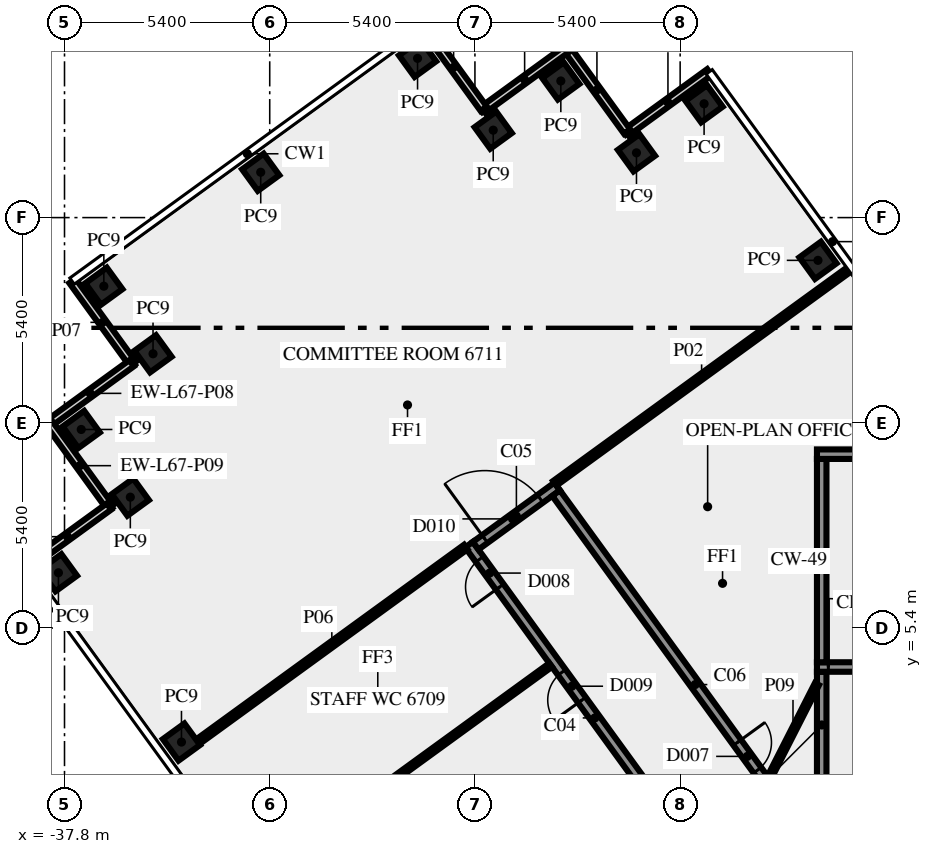
"""IFC4 building model, lengths in metres.
Left out: names, types, materials, properties, quantities, classifications, styles, units other than length and angle.
Written with IfcOpenShell. Run it as: python <this file> out.ifc"""

import sys

from ifc_helpers import new_model, si_unit, direction, frame, frame_2d, origin, origin_2d, place, context, subcontext, project, spatial, rectangle, extrude, element, fill, save


model = new_model("IFC4")
c1 = context("Model", 3, precision=1e-05, world=origin(), true_north=direction((0.0, 1.0)))
c2 = subcontext(c1, "Body", "Model", "MODEL_VIEW")
j1 = project(units=[si_unit("LENGTHUNIT", "METRE"), si_unit("PLANEANGLEUNIT", "RADIAN")], contexts=[c1])
p1 = place(None, origin())
s1 = spatial("IfcSite", under=j1, at=p1, CompositionType="ELEMENT")
p2 = place(p1, origin())
s2 = spatial("IfcBuilding", under=s1, at=p2, CompositionType="ELEMENT")
p3 = place(p2, frame((0.0, 0.0, 289.0)))
s3 = spatial("IfcBuildingStorey", under=s2, at=p3, CompositionType="ELEMENT", Elevation=289.0)
for number, where, z_axis, x_axis in (
    (1, (-17.974, 15.075, 0.0), (0.0, 0.0, 1.0), (-0.588, 0.809, 0.0)),
    (2, (-20.97, 19.195, 0.0), (0.0, 0.0, 1.0), (-0.588, 0.809, 0.0)),
    (3, (-22.749, 17.904, 0.0), (0.0, 0.0, 1.0), (-0.588, 0.809, 0.0)),
    (4, (-24.74, 19.795, 0.0), (0.0, 0.0, 1.0), (-0.588, 0.809, 0.0)),
    (5, (-26.519, 18.5, 0.0), (0.0, 0.0, 1.0), (-0.588, 0.809, 0.0)),
    (6, (-28.51, 20.39, 0.0), (0.0, 0.0, 1.0), (-0.809, -0.588, 0.0)),
    (7, (-32.637, 17.393, 0.0), (0.0, 0.0, 1.0), (-0.809, -0.588, 0.0)),
    (8, (-36.765, 14.395, 0.0), (0.0, 0.0, 1.0), (0.588, -0.809, 0.0)),
    (9, (-35.471, 12.616, 0.0), (0.0, 0.0, 1.0), (-0.809, -0.588, 0.0)),
    (10, (-37.36, 10.625, 0.0), (0.0, 0.0, 1.0), (0.588, -0.809, 0.0)),
    (11, (-36.068, 8.844, 0.0), (0.0, 0.0, 1.0), (0.588, -0.809, 0.0)),
    (12, (-37.96, 6.855, 0.0), (0.0, 0.0, 1.0), (0.588, -0.809, 0.0)),
    (13, (-34.722, 2.4, 0.0), (0.0, 0.0, 1.0), (0.588, -0.809, 0.0)),
):
    element("IfcColumn", number, at=place(p3, frame(where, z_axis=z_axis, x_axis=x_axis)), inside=s3, PredefinedType="COLUMN", context=c2, shape_type="SweptSolid", body=[
        extrude(rectangle(XDim=0.7, YDim=0.7, at=origin_2d()), origin(), (0.0, 0.0, 1.0), 3.65),
    ])
for number, where, z_axis, x_axis in (
    (14, (-20.829, 20.025, 0.0), (0.0, 0.0, 1.0), (-0.809, -0.588, 0.0)),
    (15, (-22.996, 18.466, 0.0), (0.0, 0.0, 1.0), (-0.588, 0.809, 0.0)),
):
    element("IfcWall", number, at=place(p3, frame(where, z_axis=z_axis, x_axis=x_axis)), inside=s3, PredefinedType="SOLIDWALL", context=c2, shape_type="SweptSolid", body=[
        extrude(rectangle(XDim=2.7, YDim=0.2, at=frame_2d((1.35, 0.0))), origin(), (0.0, 0.0, 1.0), 3.65),
    ])
for number, where, z_axis, x_axis in (
    (16, (-24.6, 20.623, 0.0), (0.0, 0.0, 1.0), (-0.809, -0.588, 0.0)),
    (17, (-26.768, 19.063, 0.0), (0.0, 0.0, 1.0), (-0.588, 0.809, 0.0)),
):
    element("IfcWall", number, at=place(p3, frame(where, z_axis=z_axis, x_axis=x_axis)), inside=s3, PredefinedType="SOLIDWALL", context=c2, shape_type="SweptSolid", body=[
        extrude(rectangle(XDim=2.7, YDim=0.2, at=frame_2d((1.35, 0.0))), origin(), (0.0, 0.0, 1.0), 3.65),
    ])
for number, where, z_axis, x_axis in (
    (18, (-37.592, 14.536, 0.0), (0.0, 0.0, 1.0), (0.588, -0.809, 0.0)),
    (19, (-36.032, 12.369, 0.0), (0.0, 0.0, 1.0), (-0.809, -0.588, 0.0)),
    (20, (-38.189, 10.765, 0.0), (0.0, 0.0, 1.0), (0.588, -0.809, 0.0)),
    (21, (-36.629, 8.597, 0.0), (0.0, 0.0, 1.0), (-0.809, -0.588, 0.0)),
):
    element("IfcWall", number, at=place(p3, frame(where, z_axis=z_axis, x_axis=x_axis)), inside=s3, PredefinedType="SOLIDWALL", context=c2, shape_type="SweptSolid", body=[
        extrude(rectangle(XDim=2.7, YDim=0.2, at=frame_2d((1.35, 0.0))), origin(), (0.0, 0.0, 1.0), 3.65),
    ])
p4 = place(p3, frame((-17.875, 1.45, 0.0), z_axis=(0.0, 0.0, 1.0), x_axis=(0.0, 1.0, 0.0)))
e22 = element("IfcWall", 22, at=p4, inside=s3, PredefinedType="SHEAR", context=c2, shape_type="SweptSolid", body=[
    extrude(rectangle(XDim=2.8, YDim=0.25, at=frame_2d((1.4, 0.0))), origin(), (0.0, 0.0, 1.0), 3.65),
])
p5 = place(p3, frame((-18.0, 4.375, 0.0), z_axis=(0.0, 0.0, 1.0), x_axis=(1.0, 0.0, 0.0)))
e23 = element("IfcWall", 23, at=p5, inside=s3, PredefinedType="SHEAR", context=c2, shape_type="SweptSolid", body=[
    extrude(rectangle(XDim=10.5, YDim=0.25, at=frame_2d((5.25, 0.0))), origin(), (0.0, 0.0, 1.0), 3.65),
])
p6 = place(p5, frame((0.3, 0.0, 0.0)))
e24 = element("IfcOpeningElement", 24, at=p6, cuts=e23, PredefinedType="OPENING", context=c2, shape_type="SweptSolid", body=[
    extrude(rectangle(XDim=1.8, YDim=2.1, at=frame_2d((0.9, 1.05))), frame((0.0, 0.135, 0.0), z_axis=(0.0, -1.0, 0.0), x_axis=(1.0, 0.0, 0.0)), (0.0, 0.0, 1.0), 0.27),
])
p7 = place(p3, frame((-17.875, 4.5, 0.0), z_axis=(0.0, 0.0, 1.0), x_axis=(0.0, 1.0, 0.0)))
e25 = element("IfcWall", 25, at=p7, inside=s3, PredefinedType="SHEAR", context=c2, shape_type="SweptSolid", body=[
    extrude(rectangle(XDim=5.35, YDim=0.25, at=frame_2d((2.675, 0.0))), origin(), (0.0, 0.0, 1.0), 3.65),
])
p8 = place(p3, frame((-18.0, 9.975, 0.0), z_axis=(0.0, 0.0, 1.0), x_axis=(1.0, 0.0, 0.0)))
e26 = element("IfcWall", 26, at=p8, inside=s3, PredefinedType="SHEAR", context=c2, shape_type="SweptSolid", body=[
    extrude(rectangle(XDim=10.5, YDim=0.25, at=frame_2d((5.25, 0.0))), origin(), (0.0, 0.0, 1.0), 3.65),
])
p9 = place(p8, frame((4.5, 0.0, 1.0)))
e27 = element("IfcOpeningElement", 27, at=p9, cuts=e26, PredefinedType="OPENING", context=c2, shape_type="SweptSolid", body=[
    extrude(rectangle(XDim=1.2, YDim=1.2, at=frame_2d((0.6, 0.6))), frame((0.0, 0.135, 0.0), z_axis=(0.0, -1.0, 0.0), x_axis=(1.0, 0.0, 0.0)), (0.0, 0.0, 1.0), 0.27),
])
p10 = place(p3, frame((-20.531, -1.523, 0.0), z_axis=(0.0, 0.0, 1.0), x_axis=(-0.587782646447, 0.809018887626, 0.0)))
e28 = element("IfcWall", 28, at=p10, inside=s3, PredefinedType="SOLIDWALL", context=c2, shape_type="SweptSolid", body=[
    extrude(rectangle(XDim=11.27, YDim=0.25, at=frame_2d((5.635, 0.0))), origin(), (0.0, 0.0, 1.0), 3.65),
])
p11 = place(p10, frame((6.216, 0.0, 0.0)))
e29 = element("IfcOpeningElement", 29, at=p11, cuts=e28, PredefinedType="OPENING", context=c2, shape_type="SweptSolid", body=[
    extrude(rectangle(XDim=0.9, YDim=2.1, at=frame_2d((0.45, 1.05))), frame((0.0, 0.135, 0.0), z_axis=(0.0, -1.0, 0.0), x_axis=(1.0, 0.0, 0.0)), (0.0, 0.0, 1.0), 0.27),
])
p12 = place(p10, frame((9.896, 0.0, 0.0)))
e30 = element("IfcOpeningElement", 30, at=p12, cuts=e28, PredefinedType="OPENING", context=c2, shape_type="SweptSolid", body=[
    extrude(rectangle(XDim=0.9, YDim=2.1, at=frame_2d((0.45, 1.05))), frame((0.0, 0.135, 0.0), z_axis=(0.0, -1.0, 0.0), x_axis=(1.0, 0.0, 0.0)), (0.0, 0.0, 1.0), 0.27),
])
p13 = place(p3, frame((-26.981, 7.567, 0.0), z_axis=(0.0, 0.0, 1.0), x_axis=(0.809038743598, 0.587755315891, 0.0)))
e31 = element("IfcWall", 31, at=p13, inside=s3, PredefinedType="SOLIDWALL", context=c2, shape_type="SweptSolid", body=[
    extrude(rectangle(XDim=2.65, YDim=0.25, at=frame_2d((1.325, 0.0))), origin(), (0.0, 0.0, 1.0), 3.65),
])
p14 = place(p13, frame((0.3, 0.0, 0.0)))
e32 = element("IfcOpeningElement", 32, at=p14, cuts=e31, PredefinedType="OPENING", context=c2, shape_type="SweptSolid", body=[
    extrude(rectangle(XDim=1.8, YDim=2.1, at=frame_2d((0.9, 1.05))), frame((0.0, 0.135, 0.0), z_axis=(0.0, -1.0, 0.0), x_axis=(1.0, 0.0, 0.0)), (0.0, 0.0, 1.0), 0.27),
])
p15 = place(p3, frame((-24.865, 8.95, 0.0), z_axis=(0.0, 0.0, 1.0), x_axis=(0.587791617212, -0.809012369952, 0.0)))
e33 = element("IfcWall", 33, at=p15, inside=s3, PredefinedType="SOLIDWALL", context=c2, shape_type="SweptSolid", body=[
    extrude(rectangle(XDim=12.453, YDim=0.25, at=frame_2d((6.227, 0.0))), origin(), (0.0, 0.0, 1.0), 3.65),
])
p16 = place(p15, frame((8.112, 0.0, 0.0)))
e34 = element("IfcOpeningElement", 34, at=p16, cuts=e33, PredefinedType="OPENING", context=c2, shape_type="SweptSolid", body=[
    extrude(rectangle(XDim=0.9, YDim=2.1, at=frame_2d((0.45, 1.05))), frame((0.0, 0.135, 0.0), z_axis=(0.0, -1.0, 0.0), x_axis=(1.0, 0.0, 0.0)), (0.0, 0.0, 1.0), 0.27),
])
p17 = place(p3, frame((-17.172, 14.823, 0.0), z_axis=(0.0, 0.0, 1.0), x_axis=(-0.809013490065, -0.587790075531, 0.0)))
e35 = element("IfcWall", 35, at=p17, inside=s3, PredefinedType="PARTITIONING", context=c2, shape_type="SweptSolid", body=[
    extrude(rectangle(XDim=9.549, YDim=0.15, at=frame_2d((4.775, 0.0))), origin(), (0.0, 0.0, 1.0), 2.95),
])
p18 = place(p3, frame((-25.008, 4.427, 0.0), z_axis=(0.0, 0.0, 1.0), x_axis=(-0.808994684961, -0.587815957341, 0.0)))
e36 = element("IfcWall", 36, at=p18, inside=s3, PredefinedType="PARTITIONING", context=c2, shape_type="SweptSolid", body=[
    extrude(rectangle(XDim=9.55, YDim=0.12, at=frame_2d((4.775, 0.0))), origin(), (0.0, 0.0, 1.0), 2.95),
])
p19 = place(p3, frame((-34.291, 2.41, 0.0), z_axis=(0.0, 0.0, 1.0), x_axis=(0.809027940177, 0.587770186393, 0.0)))
e37 = element("IfcWall", 37, at=p19, inside=s3, PredefinedType="PARTITIONING", context=c2, shape_type="SweptSolid", body=[
    extrude(rectangle(XDim=8.715, YDim=0.15, at=frame_2d((4.357, 0.0))), origin(), (0.0, 0.0, 1.0), 3.65),
])
p20 = place(p3, frame((-19.261, 1.45, 0.0), z_axis=(0.0, 0.0, 1.0), x_axis=(0.453950796792, 0.891026752736, 0.0)))
e38 = element("IfcWall", 38, at=p20, inside=s3, PredefinedType="PARTITIONING", context=c2, shape_type="SweptSolid", body=[
    extrude(rectangle(XDim=2.778, YDim=0.12, at=frame_2d((1.389, 0.0))), origin(), (0.0, 0.0, 1.0), 3.65),
])
p21 = place(p6, origin())
e39 = element("IfcDoor", 39, at=p21, inside=s3, OperationType="DOUBLE_DOOR_SINGLE_SWING", PredefinedType="DOOR", context=c2, shape_type="SweptSolid", body=[
    extrude(rectangle(XDim=1.8, YDim=2.1, at=frame_2d((0.9, 1.05))), frame((0.0, 0.025, 0.0), z_axis=(0.0, -1.0, 0.0), x_axis=(1.0, 0.0, 0.0)), (0.0, 0.0, 1.0), 0.05),
])
fill(e24, e39)
p22 = place(p16, origin())
e40 = element("IfcDoor", 40, at=p22, inside=s3, OperationType="SINGLE_SWING_RIGHT", PredefinedType="DOOR", context=c2, shape_type="SweptSolid", body=[
    extrude(rectangle(XDim=0.9, YDim=2.1, at=frame_2d((0.45, 1.05))), frame((0.0, 0.025, 0.0), z_axis=(0.0, -1.0, 0.0), x_axis=(1.0, 0.0, 0.0)), (0.0, 0.0, 1.0), 0.05),
])
fill(e34, e40)
p23 = place(p11, origin())
e41 = element("IfcDoor", 41, at=p23, inside=s3, OperationType="SINGLE_SWING_RIGHT", PredefinedType="DOOR", context=c2, shape_type="SweptSolid", body=[
    extrude(rectangle(XDim=0.9, YDim=2.1, at=frame_2d((0.45, 1.05))), frame((0.0, 0.025, 0.0), z_axis=(0.0, -1.0, 0.0), x_axis=(1.0, 0.0, 0.0)), (0.0, 0.0, 1.0), 0.05),
])
fill(e29, e41)
p24 = place(p14, origin())
e42 = element("IfcDoor", 42, at=p24, inside=s3, OperationType="DOUBLE_DOOR_SINGLE_SWING", PredefinedType="DOOR", context=c2, shape_type="SweptSolid", body=[
    extrude(rectangle(XDim=1.8, YDim=2.1, at=frame_2d((0.9, 1.05))), frame((0.0, 0.025, 0.0), z_axis=(0.0, -1.0, 0.0), x_axis=(1.0, 0.0, 0.0)), (0.0, 0.0, 1.0), 0.05),
])
fill(e32, e42)
p25 = place(p12, origin())
e43 = element("IfcDoor", 43, at=p25, inside=s3, OperationType="SINGLE_SWING_RIGHT", PredefinedType="DOOR", context=c2, shape_type="SweptSolid", body=[
    extrude(rectangle(XDim=0.9, YDim=2.1, at=frame_2d((0.45, 1.05))), frame((0.0, 0.025, 0.0), z_axis=(0.0, -1.0, 0.0), x_axis=(1.0, 0.0, 0.0)), (0.0, 0.0, 1.0), 0.05),
])
fill(e30, e43)
save(model, sys.argv[1])
